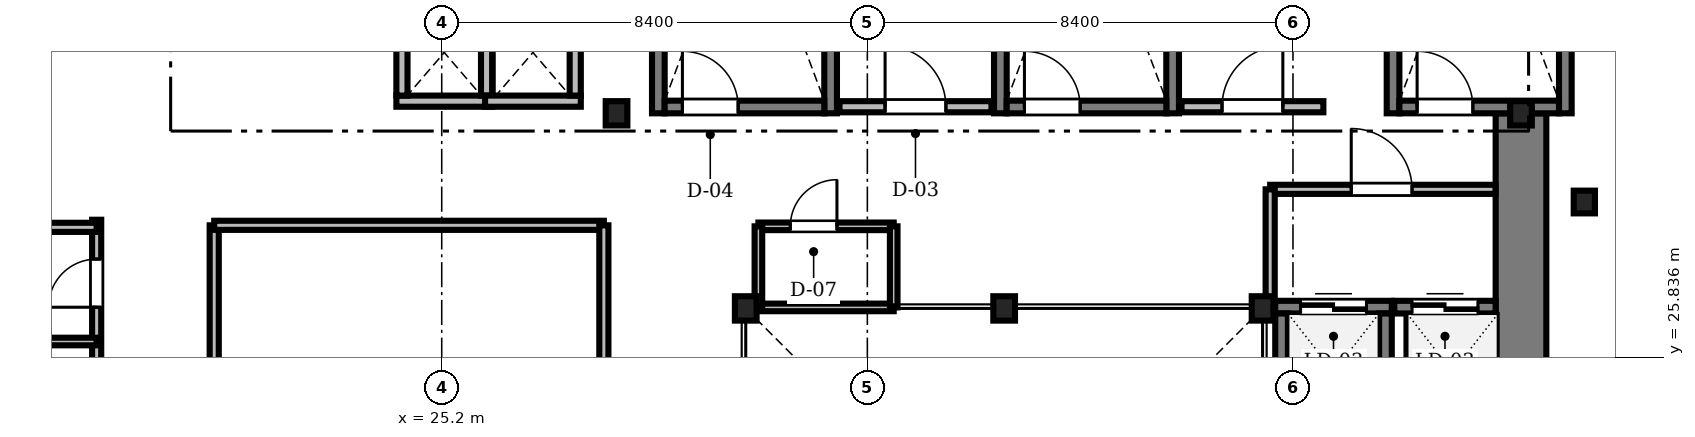
"""IFC4 building model, lengths in metres.
Left out: names, types, materials, properties, quantities, classifications, styles, units other than length and angle.
Written with IfcOpenShell. Run it as: python <this file> out.ifc"""

import sys

from ifc_helpers import new_model, si_unit, direction, frame, frame_2d, origin, origin_2d, place, context, subcontext, project, spatial, rectangle, i_section, extrude, source, transform, mapped, element, fill, save


model = new_model("IFC4")
c1 = context("Model", 3, precision=1e-05, world=origin(), true_north=direction((0.0, 1.0)))
c2 = subcontext(c1, "Body", "Model", "MODEL_VIEW")
j1 = project(units=[si_unit("LENGTHUNIT", "METRE"), si_unit("PLANEANGLEUNIT", "RADIAN")], contexts=[c1])
p1 = place(None, origin())
s1 = spatial("IfcSite", under=j1, at=p1, CompositionType="ELEMENT")
p2 = place(p1, origin())
s2 = spatial("IfcBuilding", under=s1, at=p2, CompositionType="ELEMENT")
p3 = place(p2, frame((0.0, 0.0, 42.2)))
s3 = spatial("IfcBuildingStorey", under=s2, at=p3, CompositionType="ELEMENT", Elevation=42.2)
m1 = source(origin(), c2, "Body", "SweptSolid", [
    extrude(rectangle(XDim=13.15, YDim=1.0, at=frame_2d((6.575, 0.0))), origin(), (0.0, 0.0, 1.0), 3.41),
])
p4 = place(p3, frame((46.5, 17.5, 0.0), z_axis=(0.0, 0.0, 1.0), x_axis=(0.0, 1.0, 0.0)))
e1 = element("IfcWall", 1, at=p4, inside=s3, PredefinedType="SHEAR", context=c2, shape_type="MappedRepresentation", body=[
    mapped(m1, transform((0.0, 0.0, 0.0), scale=1.0)),
])
m2 = source(origin(), c2, "Body", "SweptSolid", [
    extrude(i_section(OverallWidth=0.428, OverallDepth=0.481, WebThickness=0.04, FlangeThickness=0.063, FilletRadius=0.015, at=origin_2d()), origin(), (0.0, 0.0, 1.0), 3.41),
])
for number, where, z_axis, x_axis in (
    (2, (41.4, 26.8, 0.0), (0.0, 0.0, 1.0), (1.0, 0.0, 0.0)),
    (3, (36.3, 26.8, 0.0), (0.0, 0.0, 1.0), (1.0, 0.0, 0.0)),
    (4, (31.2, 26.8, 0.0), (0.0, 0.0, 1.0), (1.0, 0.0, 0.0)),
    (5, (28.65, 30.65, 0.0), (0.0, 0.0, 1.0), (1.0, 0.0, 0.0)),
    (6, (46.5, 30.65, 0.0), (0.0, 0.0, 1.0), (1.0, 0.0, 0.0)),
):
    element("IfcColumn", number, at=place(p3, frame(where, z_axis=z_axis, x_axis=x_axis)), inside=s3, PredefinedType="COLUMN", context=c2, shape_type="MappedRepresentation", body=[
        mapped(m2, transform((0.0, 0.0, 0.0), scale=1.0)),
    ])
m3 = source(origin(), c2, "Body", "SweptSolid", [
    extrude(i_section(OverallWidth=0.419, OverallDepth=0.449, WebThickness=0.031, FlangeThickness=0.048, FilletRadius=0.015, at=origin_2d()), origin(), (0.0, 0.0, 1.0), 3.41),
])
p5 = place(p3, frame((47.75, 28.9, 0.0), z_axis=(0.0, 0.0, 1.0), x_axis=(1.0, 0.0, 0.0)))
e7 = element("IfcColumn", 7, at=p5, inside=s3, PredefinedType="COLUMN", context=c2, shape_type="MappedRepresentation", body=[
    mapped(m3, transform((0.0, 0.0, 0.0), scale=1.0)),
])
m4 = source(origin(), c2, "Body", "SweptSolid", [
    extrude(rectangle(XDim=9.15, YDim=0.25, at=frame_2d((4.575, 0.0))), origin(), (0.0, 0.0, 1.0), 3.45),
])
for number, where, z_axis, x_axis in (
    (8, (29.475, 30.65, 0.0), (0.0, 0.0, 1.0), (0.0, 1.0, 0.0)),
    (9, (32.875, 30.65, 0.0), (0.0, 0.0, 1.0), (0.0, 1.0, 0.0)),
):
    element("IfcWall", number, at=place(p3, frame(where, z_axis=z_axis, x_axis=x_axis)), inside=s3, PredefinedType="SOLIDWALL", context=c2, shape_type="MappedRepresentation", body=[
        mapped(m4, transform((0.0, 0.0, 0.0), scale=1.0)),
    ])
m5 = source(origin(), c2, "Body", "SweptSolid", [
    extrude(rectangle(XDim=3.15, YDim=0.25, at=frame_2d((1.575, 0.0))), origin(), (0.0, 0.0, 1.0), 3.45),
])
p6 = place(p3, frame((29.6, 30.775, 0.0), z_axis=(0.0, 0.0, 1.0), x_axis=(1.0, 0.0, 0.0)))
e10 = element("IfcWall", 10, at=p6, inside=s3, PredefinedType="SOLIDWALL", context=c2, shape_type="MappedRepresentation", body=[
    mapped(m5, transform((0.0, 0.0, 0.0), scale=1.0)),
])
m6 = source(origin(), c2, "Body", "SweptSolid", [
    extrude(rectangle(XDim=1.1, YDim=2.2, at=frame_2d((0.55, 1.1))), frame((0.0, 0.135, 0.0), z_axis=(0.0, -1.0, 0.0), x_axis=(1.0, 0.0, 0.0)), (0.0, 0.0, 1.0), 0.27),
])
p7 = place(p6, frame((0.35, 0.0, 0.0)))
e11 = element("IfcOpeningElement", 11, at=p7, cuts=e10, PredefinedType="OPENING", context=c2, shape_type="MappedRepresentation", body=[
    mapped(m6, transform((0.0, 0.0, 0.0), scale=1.0)),
])
for number, where, z_axis, x_axis in (
    (12, (36.225, 30.65, 0.0), (0.0, 0.0, 1.0), (0.0, 1.0, 0.0)),
    (13, (39.625, 30.65, 0.0), (0.0, 0.0, 1.0), (0.0, 1.0, 0.0)),
):
    element("IfcWall", number, at=place(p3, frame(where, z_axis=z_axis, x_axis=x_axis)), inside=s3, PredefinedType="SOLIDWALL", context=c2, shape_type="MappedRepresentation", body=[
        mapped(m4, transform((0.0, 0.0, 0.0), scale=1.0)),
    ])
p8 = place(p3, frame((36.35, 30.775, 0.0), z_axis=(0.0, 0.0, 1.0), x_axis=(1.0, 0.0, 0.0)))
e14 = element("IfcWall", 14, at=p8, inside=s3, PredefinedType="SOLIDWALL", context=c2, shape_type="MappedRepresentation", body=[
    mapped(m5, transform((0.0, 0.0, 0.0), scale=1.0)),
])
p9 = place(p8, frame((0.35, 0.0, 0.0)))
e15 = element("IfcOpeningElement", 15, at=p9, cuts=e14, PredefinedType="OPENING", context=c2, shape_type="MappedRepresentation", body=[
    mapped(m6, transform((0.0, 0.0, 0.0), scale=1.0)),
])
for number, where, z_axis, x_axis in (
    (16, (43.975, 30.65, 0.0), (0.0, 0.0, 1.0), (0.0, 1.0, 0.0)),
    (17, (47.375, 30.65, 0.0), (0.0, 0.0, 1.0), (0.0, 1.0, 0.0)),
):
    element("IfcWall", number, at=place(p3, frame(where, z_axis=z_axis, x_axis=x_axis)), inside=s3, PredefinedType="SOLIDWALL", context=c2, shape_type="MappedRepresentation", body=[
        mapped(m4, transform((0.0, 0.0, 0.0), scale=1.0)),
    ])
p10 = place(p3, frame((44.1, 30.775, 0.0), z_axis=(0.0, 0.0, 1.0), x_axis=(1.0, 0.0, 0.0)))
e18 = element("IfcWall", 18, at=p10, inside=s3, PredefinedType="SOLIDWALL", context=c2, shape_type="MappedRepresentation", body=[
    mapped(m5, transform((0.0, 0.0, 0.0), scale=1.0)),
])
p11 = place(p10, frame((0.35, 0.0, 0.0)))
e19 = element("IfcOpeningElement", 19, at=p11, cuts=e18, PredefinedType="OPENING", context=c2, shape_type="MappedRepresentation", body=[
    mapped(m6, transform((0.0, 0.0, 0.0), scale=1.0)),
])
m7 = source(origin(), c2, "Body", "SweptSolid", [
    extrude(rectangle(XDim=3.0, YDim=0.22, at=frame_2d((1.5, 0.0))), origin(), (0.0, 0.0, 1.0), 3.41),
])
p12 = place(p3, frame((33.05, 30.78, 0.0), z_axis=(0.0, 0.0, 1.0), x_axis=(1.0, 0.0, 0.0)))
e20 = element("IfcWall", 20, at=p12, inside=s3, PredefinedType="SOLIDWALL", context=c2, shape_type="MappedRepresentation", body=[
    mapped(m7, transform((0.0, 0.0, 0.0), scale=1.0)),
])
m8 = source(origin(), c2, "Body", "SweptSolid", [
    extrude(rectangle(XDim=1.2, YDim=2.2, at=frame_2d((0.6, 1.1))), frame((0.0, 0.12, 0.0), z_axis=(0.0, -1.0, 0.0), x_axis=(1.0, 0.0, 0.0)), (0.0, 0.0, 1.0), 0.24),
])
p13 = place(p12, frame((0.9, 0.0, 0.0)))
e21 = element("IfcOpeningElement", 21, at=p13, cuts=e20, PredefinedType="OPENING", context=c2, shape_type="MappedRepresentation", body=[
    mapped(m8, transform((0.0, 0.0, 0.0), scale=1.0)),
])
m9 = source(origin(), c2, "Body", "SweptSolid", [
    extrude(rectangle(XDim=2.8, YDim=0.22, at=frame_2d((1.4, 0.0))), origin(), (0.0, 0.0, 1.0), 3.41),
])
p14 = place(p3, frame((39.8, 30.78, 0.0), z_axis=(0.0, 0.0, 1.0), x_axis=(1.0, 0.0, 0.0)))
e22 = element("IfcWall", 22, at=p14, inside=s3, PredefinedType="SOLIDWALL", context=c2, shape_type="MappedRepresentation", body=[
    mapped(m9, transform((0.0, 0.0, 0.0), scale=1.0)),
])
p15 = place(p14, frame((0.8, 0.0, 0.0)))
e23 = element("IfcOpeningElement", 23, at=p15, cuts=e22, PredefinedType="OPENING", context=c2, shape_type="MappedRepresentation", body=[
    mapped(m8, transform((0.0, 0.0, 0.0), scale=1.0)),
])
m10 = source(origin(), c2, "Body", "SweptSolid", [
    extrude(rectangle(XDim=1.89, YDim=0.22, at=frame_2d((0.945, 0.0))), origin(), (0.0, 0.0, 1.0), 3.41),
])
p16 = place(p3, frame((24.305, 30.89, 0.0), z_axis=(0.0, 0.0, 1.0), x_axis=(1.0, 0.0, 0.0)))
e24 = element("IfcWall", 24, at=p16, inside=s3, PredefinedType="SOLIDWALL", context=c2, shape_type="MappedRepresentation", body=[
    mapped(m10, transform((0.0, 0.0, 0.0), scale=1.0)),
])
m11 = source(origin(), c2, "Body", "SweptSolid", [
    extrude(rectangle(XDim=1.7, YDim=0.22, at=frame_2d((0.85, 0.0))), origin(), (0.0, 0.0, 1.0), 3.41),
])
for number, where, z_axis, x_axis in (
    (25, (24.415, 31.0, 0.0), (0.0, 0.0, 1.0), (0.0, 1.0, 0.0)),
    (26, (26.085, 31.0, 0.0), (0.0, 0.0, 1.0), (0.0, 1.0, 0.0)),
):
    element("IfcWall", number, at=place(p3, frame(where, z_axis=z_axis, x_axis=x_axis)), inside=s3, PredefinedType="SOLIDWALL", context=c2, shape_type="MappedRepresentation", body=[
        mapped(m11, transform((0.0, 0.0, 0.0), scale=1.0)),
    ])
p17 = place(p3, frame((26.055, 30.89, 0.0), z_axis=(0.0, 0.0, 1.0), x_axis=(1.0, 0.0, 0.0)))
e27 = element("IfcWall", 27, at=p17, inside=s3, PredefinedType="SOLIDWALL", context=c2, shape_type="MappedRepresentation", body=[
    mapped(m10, transform((0.0, 0.0, 0.0), scale=1.0)),
])
p18 = place(p3, frame((27.835, 31.0, 0.0), z_axis=(0.0, 0.0, 1.0), x_axis=(0.0, 1.0, 0.0)))
e28 = element("IfcWall", 28, at=p18, inside=s3, PredefinedType="SOLIDWALL", context=c2, shape_type="MappedRepresentation", body=[
    mapped(m11, transform((0.0, 0.0, 0.0), scale=1.0)),
])
m12 = source(origin(), c2, "Body", "SweptSolid", [
    extrude(rectangle(XDim=2.3, YDim=0.25, at=frame_2d((1.15, 0.0))), origin(), (0.0, 0.0, 1.0), 3.41),
])
p19 = place(p3, frame((41.65, 26.825, 0.0), z_axis=(0.0, 0.0, 1.0), x_axis=(1.0, 0.0, 0.0)))
e29 = element("IfcWall", 29, at=p19, inside=s3, PredefinedType="SOLIDWALL", context=c2, shape_type="MappedRepresentation", body=[
    mapped(m12, transform((0.0, 0.0, 0.0), scale=1.0)),
])
m13 = source(origin(), c2, "Body", "SweptSolid", [
    extrude(rectangle(XDim=1.3, YDim=2.3, at=frame_2d((0.65, 1.15))), frame((0.0, 0.135, 0.0), z_axis=(0.0, -1.0, 0.0), x_axis=(1.0, 0.0, 0.0)), (0.0, 0.0, 1.0), 0.27),
])
p20 = place(p19, frame((0.5, 0.0, 0.0)))
e30 = element("IfcOpeningElement", 30, at=p20, cuts=e29, PredefinedType="OPENING", context=c2, shape_type="MappedRepresentation", body=[
    mapped(m13, transform((0.0, 0.0, 0.0), scale=1.0)),
])
for number, where, z_axis, x_axis in (
    (31, (41.775, 24.4, 0.0), (0.0, 0.0, 1.0), (0.0, 1.0, 0.0)),
    (32, (43.825, 24.4, 0.0), (0.0, 0.0, 1.0), (0.0, 1.0, 0.0)),
):
    element("IfcWall", number, at=place(p3, frame(where, z_axis=z_axis, x_axis=x_axis)), inside=s3, PredefinedType="SOLIDWALL", context=c2, shape_type="MappedRepresentation", body=[
        mapped(m12, transform((0.0, 0.0, 0.0), scale=1.0)),
    ])
m14 = source(origin(), c2, "Body", "SweptSolid", [
    extrude(rectangle(XDim=2.0, YDim=0.25, at=frame_2d((1.0, 0.0))), origin(), (0.0, 0.0, 1.0), 3.41),
])
p21 = place(p3, frame((44.0, 26.825, 0.0), z_axis=(0.0, 0.0, 1.0), x_axis=(1.0, 0.0, 0.0)))
e33 = element("IfcWall", 33, at=p21, inside=s3, PredefinedType="SOLIDWALL", context=c2, shape_type="MappedRepresentation", body=[
    mapped(m14, transform((0.0, 0.0, 0.0), scale=1.0)),
])
p22 = place(p21, frame((0.35, 0.0, 0.0)))
e34 = element("IfcOpeningElement", 34, at=p22, cuts=e33, PredefinedType="OPENING", context=c2, shape_type="MappedRepresentation", body=[
    mapped(m13, transform((0.0, 0.0, 0.0), scale=1.0)),
])
m15 = source(origin(), c2, "Body", "SweptSolid", [
    extrude(rectangle(XDim=13.84, YDim=0.18, at=frame_2d((6.92, 0.0))), origin(), (0.0, 0.0, 1.0), 2.802),
])
p23 = place(p3, frame((18.39, 14.71, 0.0), z_axis=(0.0, 0.0, 1.0), x_axis=(0.0, 1.0, 0.0)))
e35 = element("IfcWall", 35, at=p23, inside=s3, PredefinedType="PARTITIONING", context=c2, shape_type="MappedRepresentation", body=[
    mapped(m15, transform((0.0, 0.0, 0.0), scale=1.0)),
])
m16 = source(origin(), c2, "Body", "SweptSolid", [
    extrude(rectangle(XDim=1.05, YDim=2.2, at=frame_2d((0.525, 1.1))), frame((0.0, 0.1, 0.0), z_axis=(0.0, -1.0, 0.0), x_axis=(1.0, 0.0, 0.0)), (0.0, 0.0, 1.0), 0.2),
])
p24 = place(p23, frame((1.762, 0.0, 0.0)))
e36 = element("IfcOpeningElement", 36, at=p24, cuts=e35, PredefinedType="OPENING", context=c2, shape_type="MappedRepresentation", body=[
    mapped(m16, transform((0.0, 0.0, 0.0), scale=1.0)),
])
m17 = source(origin(), c2, "Body", "SweptSolid", [
    extrude(rectangle(XDim=0.95, YDim=2.15, at=frame_2d((0.475, 1.075))), frame((0.0, 0.1, 0.0), z_axis=(0.0, -1.0, 0.0), x_axis=(1.0, 0.0, 0.0)), (0.0, 0.0, 1.0), 0.2),
])
p25 = place(p23, frame((7.55, 0.0, 0.0)))
e37 = element("IfcOpeningElement", 37, at=p25, cuts=e35, PredefinedType="OPENING", context=c2, shape_type="MappedRepresentation", body=[
    mapped(m17, transform((0.0, 0.0, 0.0), scale=1.0)),
])
p26 = place(p23, frame((12.113, 0.0, 0.0)))
e38 = element("IfcOpeningElement", 38, at=p26, cuts=e35, PredefinedType="OPENING", context=c2, shape_type="MappedRepresentation", body=[
    mapped(m17, transform((0.0, 0.0, 0.0), scale=1.0)),
])
m18 = source(origin(), c2, "Body", "SweptSolid", [
    extrude(rectangle(XDim=6.54, YDim=0.18, at=frame_2d((3.27, 0.0))), origin(), (0.0, 0.0, 1.0), 2.802),
])
p27 = place(p3, frame((20.71, 21.9, 0.0), z_axis=(0.0, 0.0, 1.0), x_axis=(0.0, 1.0, 0.0)))
e39 = element("IfcWall", 39, at=p27, inside=s3, PredefinedType="PARTITIONING", context=c2, shape_type="MappedRepresentation", body=[
    mapped(m18, transform((0.0, 0.0, 0.0), scale=1.0)),
])
p28 = place(p27, frame((2.2, 0.0, 0.0)))
e40 = element("IfcOpeningElement", 40, at=p28, cuts=e39, PredefinedType="OPENING", context=c2, shape_type="MappedRepresentation", body=[
    mapped(m16, transform((0.0, 0.0, 0.0), scale=1.0)),
])
m19 = source(origin(), c2, "Body", "SweptSolid", [
    extrude(rectangle(XDim=4.448, YDim=0.18, at=frame_2d((2.224, 0.0))), origin(), (0.0, 0.0, 1.0), 3.042),
])
p29 = place(p3, frame((41.55, 29.15, 0.0), z_axis=(0.0, 0.0, 1.0), x_axis=(1.0, 0.0, 0.0)))
e41 = element("IfcWall", 41, at=p29, inside=s3, PredefinedType="PARTITIONING", context=c2, shape_type="MappedRepresentation", body=[
    mapped(m19, transform((0.0, 0.0, 0.0), scale=1.0)),
])
m20 = source(origin(), c2, "Body", "SweptSolid", [
    extrude(rectangle(XDim=1.2, YDim=2.2, at=frame_2d((0.6, 1.1))), frame((0.0, 0.1, 0.0), z_axis=(0.0, -1.0, 0.0), x_axis=(1.0, 0.0, 0.0)), (0.0, 0.0, 1.0), 0.2),
])
p30 = place(p29, frame((1.6, 0.0, 0.0)))
e42 = element("IfcOpeningElement", 42, at=p30, cuts=e41, PredefinedType="OPENING", context=c2, shape_type="MappedRepresentation", body=[
    mapped(m20, transform((0.0, 0.0, 0.0), scale=1.0)),
])
m21 = source(origin(), c2, "Body", "SweptSolid", [
    extrude(rectangle(XDim=2.67, YDim=0.15, at=frame_2d((1.335, 0.0))), origin(), (0.0, 0.0, 1.0), 3.042),
])
p31 = place(p3, frame((31.45, 28.42, 0.0), z_axis=(0.0, 0.0, 1.0), x_axis=(1.0, 0.0, 0.0)))
e43 = element("IfcWall", 43, at=p31, inside=s3, PredefinedType="PARTITIONING", context=c2, shape_type="MappedRepresentation", body=[
    mapped(m21, transform((0.0, 0.0, 0.0), scale=1.0)),
])
m22 = source(origin(), c2, "Body", "SweptSolid", [
    extrude(rectangle(XDim=0.92, YDim=2.1, at=frame_2d((0.46, 1.05))), frame((0.0, 0.085, 0.0), z_axis=(0.0, -1.0, 0.0), x_axis=(1.0, 0.0, 0.0)), (0.0, 0.0, 1.0), 0.17),
])
p32 = place(p31, frame((0.63, 0.0, 0.0)))
e44 = element("IfcOpeningElement", 44, at=p32, cuts=e43, PredefinedType="OPENING", context=c2, shape_type="MappedRepresentation", body=[
    mapped(m22, transform((0.0, 0.0, 0.0), scale=1.0)),
])
m23 = source(origin(), c2, "Body", "SweptSolid", [
    extrude(rectangle(XDim=16.16, YDim=0.18, at=frame_2d((8.08, 0.0))), origin(), (0.0, 0.0, 1.0), 2.652),
])
p33 = place(p3, frame((2.23, 28.4, 0.0), z_axis=(0.0, 0.0, 1.0), x_axis=(1.0, 0.0, 0.0)))
e45 = element("IfcWall", 45, at=p33, inside=s3, PredefinedType="PARTITIONING", context=c2, shape_type="MappedRepresentation", body=[
    mapped(m23, transform((0.0, 0.0, 0.0), scale=1.0)),
])
m24 = source(origin(), c2, "Body", "SweptSolid", [
    extrude(rectangle(XDim=7.69, YDim=0.18, at=frame_2d((3.845, 0.0))), origin(), (0.0, 0.0, 1.0), 3.41),
])
p34 = place(p3, frame((20.71, 28.44, 0.0), z_axis=(0.0, 0.0, 1.0), x_axis=(1.0, 0.0, 0.0)))
e46 = element("IfcWall", 46, at=p34, inside=s3, PredefinedType="PARTITIONING", context=c2, shape_type="MappedRepresentation", body=[
    mapped(m24, transform((0.0, 0.0, 0.0), scale=1.0)),
])
p35 = place(p3, frame((28.4, 21.9, 0.0), z_axis=(0.0, 0.0, 1.0), x_axis=(0.0, 1.0, 0.0)))
e47 = element("IfcWall", 47, at=p35, inside=s3, PredefinedType="PARTITIONING", context=c2, shape_type="MappedRepresentation", body=[
    mapped(m18, transform((0.0, 0.0, 0.0), scale=1.0)),
])
m25 = source(origin(), c2, "Body", "SweptSolid", [
    extrude(rectangle(XDim=2.67, YDim=0.15, at=frame_2d((1.335, 0.0))), origin(), (0.0, 0.0, 1.0), 2.952),
])
p36 = place(p3, frame((31.45, 26.82, 0.0), z_axis=(0.0, 0.0, 1.0), x_axis=(1.0, 0.0, 0.0)))
e48 = element("IfcWall", 48, at=p36, inside=s3, PredefinedType="PARTITIONING", context=c2, shape_type="MappedRepresentation", body=[
    mapped(m25, transform((0.0, 0.0, 0.0), scale=1.0)),
])
m26 = source(origin(), c2, "Body", "SweptSolid", [
    extrude(rectangle(XDim=2.36, YDim=0.15, at=frame_2d((1.18, 0.0))), origin(), (0.0, 0.0, 1.0), 3.41),
])
p37 = place(p3, frame((16.03, 26.147, 0.0), z_axis=(0.0, 0.0, 1.0), x_axis=(1.0, 0.0, 0.0)))
e49 = element("IfcWall", 49, at=p37, inside=s3, PredefinedType="PARTITIONING", context=c2, shape_type="MappedRepresentation", body=[
    mapped(m26, transform((0.0, 0.0, 0.0), scale=1.0)),
])
m27 = source(origin(), c2, "Body", "SweptSolid", [
    extrude(rectangle(XDim=2.35, YDim=0.18, at=frame_2d((1.175, 0.0))), origin(), (0.0, 0.0, 1.0), 2.802),
])
p38 = place(p3, frame((41.55, 26.8, 0.0), z_axis=(0.0, 0.0, 1.0), x_axis=(0.0, 1.0, 0.0)))
e50 = element("IfcWall", 50, at=p38, inside=s3, PredefinedType="PARTITIONING", context=c2, shape_type="MappedRepresentation", body=[
    mapped(m27, transform((0.0, 0.0, 0.0), scale=1.0)),
])
m28 = source(origin(), c2, "Body", "SweptSolid", [
    extrude(rectangle(XDim=1.6, YDim=0.15, at=frame_2d((0.8, 0.0))), origin(), (0.0, 0.0, 1.0), 2.952),
])
for number, where, z_axis, x_axis in (
    (51, (31.45, 26.82, 0.0), (0.0, 0.0, 1.0), (0.0, 1.0, 0.0)),
    (52, (34.12, 26.82, 0.0), (0.0, 0.0, 1.0), (0.0, 1.0, 0.0)),
):
    element("IfcWall", number, at=place(p3, frame(where, z_axis=z_axis, x_axis=x_axis)), inside=s3, PredefinedType="PARTITIONING", context=c2, shape_type="MappedRepresentation", body=[
        mapped(m28, transform((0.0, 0.0, 0.0), scale=1.0)),
    ])
m29 = source(origin(), c2, "Body", "SweptSolid", [
    extrude(rectangle(XDim=1.1, YDim=2.2, at=frame_2d((0.55, 1.1))), frame((0.0, 0.025, 0.0), z_axis=(0.0, -1.0, 0.0), x_axis=(1.0, 0.0, 0.0)), (0.0, 0.0, 1.0), 0.05),
])
p39 = place(p7, origin())
e53 = element("IfcDoor", 53, at=p39, inside=s3, OperationType="SINGLE_SWING_LEFT", PredefinedType="DOOR", context=c2, shape_type="MappedRepresentation", body=[
    mapped(m29, transform((0.0, 0.0, 0.0), scale=1.0)),
])
fill(e11, e53)
p40 = place(p9, origin())
e54 = element("IfcDoor", 54, at=p40, inside=s3, OperationType="SINGLE_SWING_LEFT", PredefinedType="DOOR", context=c2, shape_type="MappedRepresentation", body=[
    mapped(m29, transform((0.0, 0.0, 0.0), scale=1.0)),
])
fill(e15, e54)
p41 = place(p11, origin())
e55 = element("IfcDoor", 55, at=p41, inside=s3, OperationType="SINGLE_SWING_LEFT", PredefinedType="DOOR", context=c2, shape_type="MappedRepresentation", body=[
    mapped(m29, transform((0.0, 0.0, 0.0), scale=1.0)),
])
fill(e19, e55)
m30 = source(origin(), c2, "Body", "SweptSolid", [
    extrude(rectangle(XDim=1.2, YDim=2.2, at=frame_2d((0.6, 1.1))), frame((0.0, 0.025, 0.0), z_axis=(0.0, -1.0, 0.0), x_axis=(1.0, 0.0, 0.0)), (0.0, 0.0, 1.0), 0.05),
])
p42 = place(p13, origin())
e56 = element("IfcDoor", 56, at=p42, inside=s3, OperationType="SINGLE_SWING_LEFT", PredefinedType="DOOR", context=c2, shape_type="MappedRepresentation", body=[
    mapped(m30, transform((0.0, 0.0, 0.0), scale=1.0)),
])
fill(e21, e56)
p43 = place(p15, origin())
e57 = element("IfcDoor", 57, at=p43, inside=s3, OperationType="SINGLE_SWING_RIGHT", PredefinedType="DOOR", context=c2, shape_type="MappedRepresentation", body=[
    mapped(m30, transform((0.0, 0.0, 0.0), scale=1.0)),
])
fill(e23, e57)
m31 = source(origin(), c2, "Body", "SweptSolid", [
    extrude(rectangle(XDim=1.3, YDim=2.3, at=frame_2d((0.65, 1.15))), frame((0.0, 0.025, 0.0), z_axis=(0.0, -1.0, 0.0), x_axis=(1.0, 0.0, 0.0)), (0.0, 0.0, 1.0), 0.05),
])
p44 = place(p20, origin())
e58 = element("IfcDoor", 58, at=p44, inside=s3, OperationType="DOUBLE_DOOR_SLIDING", PredefinedType="DOOR", context=c2, shape_type="MappedRepresentation", body=[
    mapped(m31, transform((0.0, 0.0, 0.0), scale=1.0)),
])
fill(e30, e58)
p45 = place(p22, origin())
e59 = element("IfcDoor", 59, at=p45, inside=s3, OperationType="DOUBLE_DOOR_SLIDING", PredefinedType="DOOR", context=c2, shape_type="MappedRepresentation", body=[
    mapped(m31, transform((0.0, 0.0, 0.0), scale=1.0)),
])
fill(e34, e59)
m32 = source(origin(), c2, "Body", "SweptSolid", [
    extrude(rectangle(XDim=0.95, YDim=2.15, at=frame_2d((0.475, 1.075))), frame((0.0, 0.025, 0.0), z_axis=(0.0, -1.0, 0.0), x_axis=(1.0, 0.0, 0.0)), (0.0, 0.0, 1.0), 0.05),
])
p46 = place(p26, origin())
e60 = element("IfcDoor", 60, at=p46, inside=s3, OperationType="SINGLE_SWING_LEFT", PredefinedType="DOOR", context=c2, shape_type="MappedRepresentation", body=[
    mapped(m32, transform((0.0, 0.0, 0.0), scale=1.0)),
])
fill(e38, e60)
p47 = place(p30, origin())
e61 = element("IfcDoor", 61, at=p47, inside=s3, OperationType="SINGLE_SWING_LEFT", PredefinedType="DOOR", context=c2, shape_type="MappedRepresentation", body=[
    mapped(m30, transform((0.0, 0.0, 0.0), scale=1.0)),
])
fill(e42, e61)
m33 = source(origin(), c2, "Body", "SweptSolid", [
    extrude(rectangle(XDim=0.92, YDim=2.1, at=frame_2d((0.46, 1.05))), frame((0.0, 0.025, 0.0), z_axis=(0.0, -1.0, 0.0), x_axis=(1.0, 0.0, 0.0)), (0.0, 0.0, 1.0), 0.05),
])
p48 = place(p32, origin())
e62 = element("IfcDoor", 62, at=p48, inside=s3, OperationType="SINGLE_SWING_RIGHT", PredefinedType="DOOR", context=c2, shape_type="MappedRepresentation", body=[
    mapped(m33, transform((0.0, 0.0, 0.0), scale=1.0)),
])
fill(e44, e62)
save(model, sys.argv[1])
